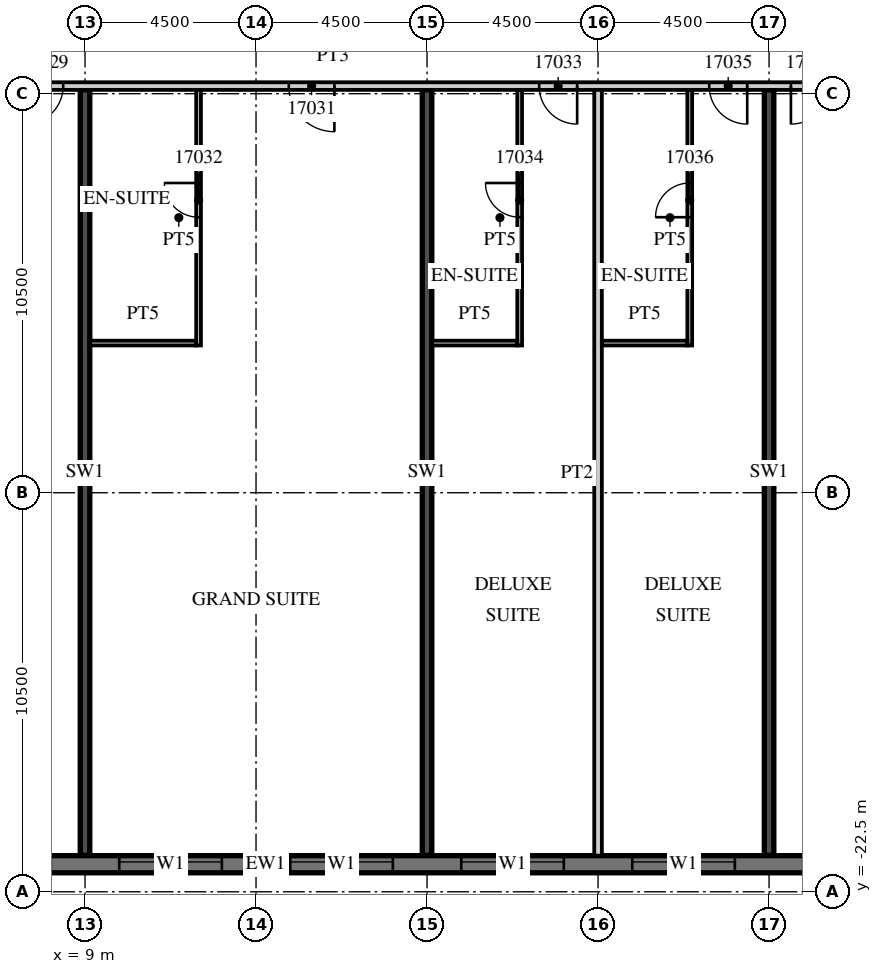
"""IFC4 building model, lengths in metres.
Left out: names, types, materials, properties, quantities, classifications, styles, units other than length and angle.
Written with IfcOpenShell. Run it as: python <this file> out.ifc"""

import sys

from ifc_helpers import new_model, si_unit, direction, frame, frame_2d, origin, place, context, subcontext, project, spatial, rectangle, extrude, element, fill, save


model = new_model("IFC4")
c1 = context("Model", 3, precision=1e-05, world=origin(), true_north=direction((0.0, 1.0)))
c2 = subcontext(c1, "Body", "Model", "MODEL_VIEW")
j1 = project(units=[si_unit("LENGTHUNIT", "METRE"), si_unit("PLANEANGLEUNIT", "RADIAN")], contexts=[c1])
p1 = place(None, origin())
s1 = spatial("IfcSite", under=j1, at=p1, CompositionType="ELEMENT")
p2 = place(p1, origin())
s2 = spatial("IfcBuilding", under=s1, at=p2, CompositionType="ELEMENT")
p3 = place(p2, frame((0.0, 0.0, 86.4)))
s3 = spatial("IfcBuildingStorey", under=s2, at=p3, CompositionType="ELEMENT", Elevation=86.4)
for number, where, z_axis, x_axis in (
    (1, (9.0, -21.54, 0.0), (0.0, 0.0, 1.0), (0.0, 1.0, 0.0)),
    (2, (18.0, -21.54, 0.0), (0.0, 0.0, 1.0), (0.0, 1.0, 0.0)),
    (3, (27.0, -21.54, 0.0), (0.0, 0.0, 1.0), (0.0, 1.0, 0.0)),
):
    element("IfcWall", number, at=place(p3, frame(where, z_axis=z_axis, x_axis=x_axis)), inside=s3, PredefinedType="SHEAR", context=c2, shape_type="SweptSolid", body=[
        extrude(rectangle(XDim=20.14, YDim=0.25, at=frame_2d((10.07, 0.0))), origin(), (0.0, 0.0, 1.0), 3.3),
    ])
p4 = place(p3, frame((-13.5, -21.775, 0.0), z_axis=(0.0, 0.0, 1.0), x_axis=(1.0, 0.0, 0.0)))
e4 = element("IfcWall", 4, at=p4, inside=s3, PredefinedType="SOLIDWALL", context=c2, shape_type="SweptSolid", body=[
    extrude(rectangle(XDim=54.5, YDim=0.45, at=frame_2d((27.25, 0.0))), origin(), (0.0, 0.0, 1.0), 3.02),
])
p5 = place(p4, frame((0.9, 0.0, 0.45)))
e5 = element("IfcOpeningElement", 5, at=p5, cuts=e4, PredefinedType="OPENING", context=c2, shape_type="SweptSolid", body=[
    extrude(rectangle(XDim=2.7, YDim=2.25, at=frame_2d((1.35, 1.125))), frame((0.0, 0.235, 0.0), z_axis=(0.0, -1.0, 0.0), x_axis=(1.0, 0.0, 0.0)), (0.0, 0.0, 1.0), 0.47),
])
p6 = place(p4, frame((5.4, 0.0, 0.45)))
e6 = element("IfcOpeningElement", 6, at=p6, cuts=e4, PredefinedType="OPENING", context=c2, shape_type="SweptSolid", body=[
    extrude(rectangle(XDim=2.7, YDim=2.25, at=frame_2d((1.35, 1.125))), frame((0.0, 0.235, 0.0), z_axis=(0.0, -1.0, 0.0), x_axis=(1.0, 0.0, 0.0)), (0.0, 0.0, 1.0), 0.47),
])
p7 = place(p4, frame((9.9, 0.0, 0.45)))
e7 = element("IfcOpeningElement", 7, at=p7, cuts=e4, PredefinedType="OPENING", context=c2, shape_type="SweptSolid", body=[
    extrude(rectangle(XDim=2.7, YDim=2.25, at=frame_2d((1.35, 1.125))), frame((0.0, 0.235, 0.0), z_axis=(0.0, -1.0, 0.0), x_axis=(1.0, 0.0, 0.0)), (0.0, 0.0, 1.0), 0.47),
])
p8 = place(p4, frame((14.4, 0.0, 0.45)))
e8 = element("IfcOpeningElement", 8, at=p8, cuts=e4, PredefinedType="OPENING", context=c2, shape_type="SweptSolid", body=[
    extrude(rectangle(XDim=2.7, YDim=2.25, at=frame_2d((1.35, 1.125))), frame((0.0, 0.235, 0.0), z_axis=(0.0, -1.0, 0.0), x_axis=(1.0, 0.0, 0.0)), (0.0, 0.0, 1.0), 0.47),
])
p9 = place(p4, frame((18.9, 0.0, 0.45)))
e9 = element("IfcOpeningElement", 9, at=p9, cuts=e4, PredefinedType="OPENING", context=c2, shape_type="SweptSolid", body=[
    extrude(rectangle(XDim=2.7, YDim=2.25, at=frame_2d((1.35, 1.125))), frame((0.0, 0.235, 0.0), z_axis=(0.0, -1.0, 0.0), x_axis=(1.0, 0.0, 0.0)), (0.0, 0.0, 1.0), 0.47),
])
p10 = place(p4, frame((23.4, 0.0, 0.45)))
e10 = element("IfcOpeningElement", 10, at=p10, cuts=e4, PredefinedType="OPENING", context=c2, shape_type="SweptSolid", body=[
    extrude(rectangle(XDim=2.7, YDim=2.25, at=frame_2d((1.35, 1.125))), frame((0.0, 0.235, 0.0), z_axis=(0.0, -1.0, 0.0), x_axis=(1.0, 0.0, 0.0)), (0.0, 0.0, 1.0), 0.47),
])
p11 = place(p4, frame((27.9, 0.0, 0.45)))
e11 = element("IfcOpeningElement", 11, at=p11, cuts=e4, PredefinedType="OPENING", context=c2, shape_type="SweptSolid", body=[
    extrude(rectangle(XDim=2.7, YDim=2.25, at=frame_2d((1.35, 1.125))), frame((0.0, 0.235, 0.0), z_axis=(0.0, -1.0, 0.0), x_axis=(1.0, 0.0, 0.0)), (0.0, 0.0, 1.0), 0.47),
])
p12 = place(p4, frame((32.4, 0.0, 0.45)))
e12 = element("IfcOpeningElement", 12, at=p12, cuts=e4, PredefinedType="OPENING", context=c2, shape_type="SweptSolid", body=[
    extrude(rectangle(XDim=2.7, YDim=2.25, at=frame_2d((1.35, 1.125))), frame((0.0, 0.235, 0.0), z_axis=(0.0, -1.0, 0.0), x_axis=(1.0, 0.0, 0.0)), (0.0, 0.0, 1.0), 0.47),
])
p13 = place(p4, frame((36.9, 0.0, 0.45)))
e13 = element("IfcOpeningElement", 13, at=p13, cuts=e4, PredefinedType="OPENING", context=c2, shape_type="SweptSolid", body=[
    extrude(rectangle(XDim=2.7, YDim=2.25, at=frame_2d((1.35, 1.125))), frame((0.0, 0.235, 0.0), z_axis=(0.0, -1.0, 0.0), x_axis=(1.0, 0.0, 0.0)), (0.0, 0.0, 1.0), 0.47),
])
p14 = place(p4, frame((41.4, 0.0, 0.45)))
e14 = element("IfcOpeningElement", 14, at=p14, cuts=e4, PredefinedType="OPENING", context=c2, shape_type="SweptSolid", body=[
    extrude(rectangle(XDim=2.7, YDim=2.25, at=frame_2d((1.35, 1.125))), frame((0.0, 0.235, 0.0), z_axis=(0.0, -1.0, 0.0), x_axis=(1.0, 0.0, 0.0)), (0.0, 0.0, 1.0), 0.47),
])
p15 = place(p4, frame((45.9, 0.0, 0.45)))
e15 = element("IfcOpeningElement", 15, at=p15, cuts=e4, PredefinedType="OPENING", context=c2, shape_type="SweptSolid", body=[
    extrude(rectangle(XDim=2.7, YDim=2.25, at=frame_2d((1.35, 1.125))), frame((0.0, 0.235, 0.0), z_axis=(0.0, -1.0, 0.0), x_axis=(1.0, 0.0, 0.0)), (0.0, 0.0, 1.0), 0.47),
])
p16 = place(p4, frame((50.4, 0.0, 0.45)))
e16 = element("IfcOpeningElement", 16, at=p16, cuts=e4, PredefinedType="OPENING", context=c2, shape_type="SweptSolid", body=[
    extrude(rectangle(XDim=2.7, YDim=2.25, at=frame_2d((1.35, 1.125))), frame((0.0, 0.235, 0.0), z_axis=(0.0, -1.0, 0.0), x_axis=(1.0, 0.0, 0.0)), (0.0, 0.0, 1.0), 0.47),
])
p17 = place(p3, frame((-13.5, -1.3, 0.0), z_axis=(0.0, 0.0, 1.0), x_axis=(1.0, 0.0, 0.0)))
e17 = element("IfcWall", 17, at=p17, inside=s3, PredefinedType="PARTITIONING", context=c2, shape_type="SweptSolid", body=[
    extrude(rectangle(XDim=58.05, YDim=0.2, at=frame_2d((29.025, 0.0))), origin(), (0.0, 0.0, 1.0), 3.02),
])
p18 = place(p17, frame((2.925, 0.0, 0.0)))
e18 = element("IfcOpeningElement", 18, at=p18, cuts=e17, PredefinedType="OPENING", context=c2, shape_type="SweptSolid", body=[
    extrude(rectangle(XDim=1.0, YDim=2.1, at=frame_2d((0.5, 1.05))), frame((0.0, 0.11, 0.0), z_axis=(0.0, -1.0, 0.0), x_axis=(1.0, 0.0, 0.0)), (0.0, 0.0, 1.0), 0.22),
])
p19 = place(p17, frame((5.075, 0.0, 0.0)))
e19 = element("IfcOpeningElement", 19, at=p19, cuts=e17, PredefinedType="OPENING", context=c2, shape_type="SweptSolid", body=[
    extrude(rectangle(XDim=1.0, YDim=2.1, at=frame_2d((0.5, 1.05))), frame((0.0, 0.11, 0.0), z_axis=(0.0, -1.0, 0.0), x_axis=(1.0, 0.0, 0.0)), (0.0, 0.0, 1.0), 0.22),
])
p20 = place(p17, frame((9.55, 0.0, 0.0)))
e20 = element("IfcOpeningElement", 20, at=p20, cuts=e17, PredefinedType="OPENING", context=c2, shape_type="SweptSolid", body=[
    extrude(rectangle(XDim=1.0, YDim=2.1, at=frame_2d((0.5, 1.05))), frame((0.0, 0.11, 0.0), z_axis=(0.0, -1.0, 0.0), x_axis=(1.0, 0.0, 0.0)), (0.0, 0.0, 1.0), 0.22),
])
p21 = place(p17, frame((14.075, 0.0, 0.0)))
e21 = element("IfcOpeningElement", 21, at=p21, cuts=e17, PredefinedType="OPENING", context=c2, shape_type="SweptSolid", body=[
    extrude(rectangle(XDim=1.0, YDim=2.1, at=frame_2d((0.5, 1.05))), frame((0.0, 0.11, 0.0), z_axis=(0.0, -1.0, 0.0), x_axis=(1.0, 0.0, 0.0)), (0.0, 0.0, 1.0), 0.22),
])
p22 = place(p17, frame((20.925, 0.0, 0.0)))
e22 = element("IfcOpeningElement", 22, at=p22, cuts=e17, PredefinedType="OPENING", context=c2, shape_type="SweptSolid", body=[
    extrude(rectangle(XDim=1.0, YDim=2.1, at=frame_2d((0.5, 1.05))), frame((0.0, 0.11, 0.0), z_axis=(0.0, -1.0, 0.0), x_axis=(1.0, 0.0, 0.0)), (0.0, 0.0, 1.0), 0.22),
])
p23 = place(p17, frame((27.862, 0.0, 0.0)))
e23 = element("IfcOpeningElement", 23, at=p23, cuts=e17, PredefinedType="OPENING", context=c2, shape_type="SweptSolid", body=[
    extrude(rectangle(XDim=1.2, YDim=2.1, at=frame_2d((0.6, 1.05))), frame((0.0, 0.11, 0.0), z_axis=(0.0, -1.0, 0.0), x_axis=(1.0, 0.0, 0.0)), (0.0, 0.0, 1.0), 0.22),
])
p24 = place(p17, frame((34.45, 0.0, 0.0)))
e24 = element("IfcOpeningElement", 24, at=p24, cuts=e17, PredefinedType="OPENING", context=c2, shape_type="SweptSolid", body=[
    extrude(rectangle(XDim=1.0, YDim=2.1, at=frame_2d((0.5, 1.05))), frame((0.0, 0.11, 0.0), z_axis=(0.0, -1.0, 0.0), x_axis=(1.0, 0.0, 0.0)), (0.0, 0.0, 1.0), 0.22),
])
p25 = place(p17, frame((38.925, 0.0, 0.0)))
e25 = element("IfcOpeningElement", 25, at=p25, cuts=e17, PredefinedType="OPENING", context=c2, shape_type="SweptSolid", body=[
    extrude(rectangle(XDim=1.0, YDim=2.1, at=frame_2d((0.5, 1.05))), frame((0.0, 0.11, 0.0), z_axis=(0.0, -1.0, 0.0), x_axis=(1.0, 0.0, 0.0)), (0.0, 0.0, 1.0), 0.22),
])
p26 = place(p17, frame((41.075, 0.0, 0.0)))
e26 = element("IfcOpeningElement", 26, at=p26, cuts=e17, PredefinedType="OPENING", context=c2, shape_type="SweptSolid", body=[
    extrude(rectangle(XDim=1.0, YDim=2.1, at=frame_2d((0.5, 1.05))), frame((0.0, 0.11, 0.0), z_axis=(0.0, -1.0, 0.0), x_axis=(1.0, 0.0, 0.0)), (0.0, 0.0, 1.0), 0.22),
])
p27 = place(p17, frame((45.55, 0.0, 0.0)))
e27 = element("IfcOpeningElement", 27, at=p27, cuts=e17, PredefinedType="OPENING", context=c2, shape_type="SweptSolid", body=[
    extrude(rectangle(XDim=1.0, YDim=2.1, at=frame_2d((0.5, 1.05))), frame((0.0, 0.11, 0.0), z_axis=(0.0, -1.0, 0.0), x_axis=(1.0, 0.0, 0.0)), (0.0, 0.0, 1.0), 0.22),
])
p28 = place(p17, frame((50.075, 0.0, 0.0)))
e28 = element("IfcOpeningElement", 28, at=p28, cuts=e17, PredefinedType="OPENING", context=c2, shape_type="SweptSolid", body=[
    extrude(rectangle(XDim=1.0, YDim=2.1, at=frame_2d((0.5, 1.05))), frame((0.0, 0.11, 0.0), z_axis=(0.0, -1.0, 0.0), x_axis=(1.0, 0.0, 0.0)), (0.0, 0.0, 1.0), 0.22),
])
p29 = place(p17, frame((56.525, 0.0, 0.0)))
e29 = element("IfcOpeningElement", 29, at=p29, cuts=e17, PredefinedType="OPENING", context=c2, shape_type="SweptSolid", body=[
    extrude(rectangle(XDim=1.0, YDim=2.1, at=frame_2d((0.5, 1.05))), frame((0.0, 0.11, 0.0), z_axis=(0.0, -1.0, 0.0), x_axis=(1.0, 0.0, 0.0)), (0.0, 0.0, 1.0), 0.22),
])
p30 = place(p3, frame((11.988, -8.125, 0.0), z_axis=(0.0, 0.0, 1.0), x_axis=(0.0, 1.0, 0.0)))
e30 = element("IfcWall", 30, at=p30, inside=s3, PredefinedType="PARTITIONING", context=c2, shape_type="SweptSolid", body=[
    extrude(rectangle(XDim=6.725, YDim=0.125, at=frame_2d((3.363, 0.0))), origin(), (0.0, 0.0, 1.0), 3.02),
])
p31 = place(p30, frame((3.375, 0.0, 0.0)))
e31 = element("IfcOpeningElement", 31, at=p31, cuts=e30, PredefinedType="OPENING", context=c2, shape_type="SweptSolid", body=[
    extrude(rectangle(XDim=0.9, YDim=2.1, at=frame_2d((0.45, 1.05))), frame((0.0, 0.073, 0.0), z_axis=(0.0, -1.0, 0.0), x_axis=(1.0, 0.0, 0.0)), (0.0, 0.0, 1.0), 0.145),
])
p32 = place(p3, frame((9.125, -8.062, 0.0), z_axis=(0.0, 0.0, 1.0), x_axis=(1.0, 0.0, 0.0)))
e32 = element("IfcWall", 32, at=p32, inside=s3, PredefinedType="PARTITIONING", context=c2, shape_type="SweptSolid", body=[
    extrude(rectangle(XDim=2.8, YDim=0.125, at=frame_2d((1.4, 0.0))), origin(), (0.0, 0.0, 1.0), 3.02),
])
p33 = place(p3, frame((22.5, -21.55, 0.0), z_axis=(0.0, 0.0, 1.0), x_axis=(0.0, 1.0, 0.0)))
e33 = element("IfcWall", 33, at=p33, inside=s3, PredefinedType="PARTITIONING", context=c2, shape_type="SweptSolid", body=[
    extrude(rectangle(XDim=20.15, YDim=0.2, at=frame_2d((10.075, 0.0))), origin(), (0.0, 0.0, 1.0), 3.02),
])
p34 = place(p3, frame((20.438, -8.125, 0.0), z_axis=(0.0, 0.0, 1.0), x_axis=(0.0, 1.0, 0.0)))
e34 = element("IfcWall", 34, at=p34, inside=s3, PredefinedType="PARTITIONING", context=c2, shape_type="SweptSolid", body=[
    extrude(rectangle(XDim=6.725, YDim=0.125, at=frame_2d((3.363, 0.0))), origin(), (0.0, 0.0, 1.0), 3.02),
])
p35 = place(p34, frame((3.375, 0.0, 0.0)))
e35 = element("IfcOpeningElement", 35, at=p35, cuts=e34, PredefinedType="OPENING", context=c2, shape_type="SweptSolid", body=[
    extrude(rectangle(XDim=0.9, YDim=2.1, at=frame_2d((0.45, 1.05))), frame((0.0, 0.073, 0.0), z_axis=(0.0, -1.0, 0.0), x_axis=(1.0, 0.0, 0.0)), (0.0, 0.0, 1.0), 0.145),
])
p36 = place(p3, frame((18.125, -8.062, 0.0), z_axis=(0.0, 0.0, 1.0), x_axis=(1.0, 0.0, 0.0)))
e36 = element("IfcWall", 36, at=p36, inside=s3, PredefinedType="PARTITIONING", context=c2, shape_type="SweptSolid", body=[
    extrude(rectangle(XDim=2.25, YDim=0.125, at=frame_2d((1.125, 0.0))), origin(), (0.0, 0.0, 1.0), 3.02),
])
p37 = place(p3, frame((24.913, -8.125, 0.0), z_axis=(0.0, 0.0, 1.0), x_axis=(0.0, 1.0, 0.0)))
e37 = element("IfcWall", 37, at=p37, inside=s3, PredefinedType="PARTITIONING", context=c2, shape_type="SweptSolid", body=[
    extrude(rectangle(XDim=6.725, YDim=0.125, at=frame_2d((3.363, 0.0))), origin(), (0.0, 0.0, 1.0), 3.02),
])
p38 = place(p37, frame((3.375, 0.0, 0.0)))
e38 = element("IfcOpeningElement", 38, at=p38, cuts=e37, PredefinedType="OPENING", context=c2, shape_type="SweptSolid", body=[
    extrude(rectangle(XDim=0.9, YDim=2.1, at=frame_2d((0.45, 1.05))), frame((0.0, 0.073, 0.0), z_axis=(0.0, -1.0, 0.0), x_axis=(1.0, 0.0, 0.0)), (0.0, 0.0, 1.0), 0.145),
])
p39 = place(p3, frame((22.6, -8.062, 0.0), z_axis=(0.0, 0.0, 1.0), x_axis=(1.0, 0.0, 0.0)))
e39 = element("IfcWall", 39, at=p39, inside=s3, PredefinedType="PARTITIONING", context=c2, shape_type="SweptSolid", body=[
    extrude(rectangle(XDim=2.25, YDim=0.125, at=frame_2d((1.125, 0.0))), origin(), (0.0, 0.0, 1.0), 3.02),
])
p40 = place(p10, origin())
e40 = element("IfcWindow", 40, at=p40, inside=s3, PartitioningType="SINGLE_PANEL", PredefinedType="WINDOW", context=c2, shape_type="SweptSolid", body=[
    extrude(rectangle(XDim=2.7, YDim=2.25, at=frame_2d((1.35, 1.125))), frame((0.0, 0.09, 0.0), z_axis=(0.0, -1.0, 0.0), x_axis=(1.0, 0.0, 0.0)), (0.0, 0.0, 1.0), 0.06),
])
fill(e10, e40)
p41 = place(p11, origin())
e41 = element("IfcWindow", 41, at=p41, inside=s3, PartitioningType="SINGLE_PANEL", PredefinedType="WINDOW", context=c2, shape_type="SweptSolid", body=[
    extrude(rectangle(XDim=2.7, YDim=2.25, at=frame_2d((1.35, 1.125))), frame((0.0, 0.09, 0.0), z_axis=(0.0, -1.0, 0.0), x_axis=(1.0, 0.0, 0.0)), (0.0, 0.0, 1.0), 0.06),
])
fill(e11, e41)
p42 = place(p12, origin())
e42 = element("IfcWindow", 42, at=p42, inside=s3, PartitioningType="SINGLE_PANEL", PredefinedType="WINDOW", context=c2, shape_type="SweptSolid", body=[
    extrude(rectangle(XDim=2.7, YDim=2.25, at=frame_2d((1.35, 1.125))), frame((0.0, 0.09, 0.0), z_axis=(0.0, -1.0, 0.0), x_axis=(1.0, 0.0, 0.0)), (0.0, 0.0, 1.0), 0.06),
])
fill(e12, e42)
p43 = place(p13, origin())
e43 = element("IfcWindow", 43, at=p43, inside=s3, PartitioningType="SINGLE_PANEL", PredefinedType="WINDOW", context=c2, shape_type="SweptSolid", body=[
    extrude(rectangle(XDim=2.7, YDim=2.25, at=frame_2d((1.35, 1.125))), frame((0.0, 0.09, 0.0), z_axis=(0.0, -1.0, 0.0), x_axis=(1.0, 0.0, 0.0)), (0.0, 0.0, 1.0), 0.06),
])
fill(e13, e43)
p44 = place(p22, origin())
e44 = element("IfcDoor", 44, at=p44, inside=s3, OperationType="SINGLE_SWING_LEFT", PredefinedType="DOOR", context=c2, shape_type="SweptSolid", body=[
    extrude(rectangle(XDim=1.0, YDim=2.1, at=frame_2d((0.5, 1.05))), frame((0.0, 0.025, 0.0), z_axis=(0.0, -1.0, 0.0), x_axis=(1.0, 0.0, 0.0)), (0.0, 0.0, 1.0), 0.05),
])
fill(e22, e44)
p45 = place(p23, origin())
e45 = element("IfcDoor", 45, at=p45, inside=s3, OperationType="SINGLE_SWING_RIGHT", PredefinedType="DOOR", context=c2, shape_type="SweptSolid", body=[
    extrude(rectangle(XDim=1.2, YDim=2.1, at=frame_2d((0.6, 1.05))), frame((0.0, 0.025, 0.0), z_axis=(0.0, -1.0, 0.0), x_axis=(1.0, 0.0, 0.0)), (0.0, 0.0, 1.0), 0.05),
])
fill(e23, e45)
p46 = place(p31, origin())
e46 = element("IfcDoor", 46, at=p46, inside=s3, OperationType="SINGLE_SWING_RIGHT", PredefinedType="DOOR", context=c2, shape_type="SweptSolid", body=[
    extrude(rectangle(XDim=0.9, YDim=2.1, at=frame_2d((0.45, 1.05))), frame((0.0, 0.025, 0.0), z_axis=(0.0, -1.0, 0.0), x_axis=(1.0, 0.0, 0.0)), (0.0, 0.0, 1.0), 0.05),
])
fill(e31, e46)
p47 = place(p24, origin())
e47 = element("IfcDoor", 47, at=p47, inside=s3, OperationType="SINGLE_SWING_RIGHT", PredefinedType="DOOR", context=c2, shape_type="SweptSolid", body=[
    extrude(rectangle(XDim=1.0, YDim=2.1, at=frame_2d((0.5, 1.05))), frame((0.0, 0.025, 0.0), z_axis=(0.0, -1.0, 0.0), x_axis=(1.0, 0.0, 0.0)), (0.0, 0.0, 1.0), 0.05),
])
fill(e24, e47)
p48 = place(p35, origin())
e48 = element("IfcDoor", 48, at=p48, inside=s3, OperationType="SINGLE_SWING_RIGHT", PredefinedType="DOOR", context=c2, shape_type="SweptSolid", body=[
    extrude(rectangle(XDim=0.9, YDim=2.1, at=frame_2d((0.45, 1.05))), frame((0.0, 0.025, 0.0), z_axis=(0.0, -1.0, 0.0), x_axis=(1.0, 0.0, 0.0)), (0.0, 0.0, 1.0), 0.05),
])
fill(e35, e48)
p49 = place(p25, origin())
e49 = element("IfcDoor", 49, at=p49, inside=s3, OperationType="SINGLE_SWING_RIGHT", PredefinedType="DOOR", context=c2, shape_type="SweptSolid", body=[
    extrude(rectangle(XDim=1.0, YDim=2.1, at=frame_2d((0.5, 1.05))), frame((0.0, 0.025, 0.0), z_axis=(0.0, -1.0, 0.0), x_axis=(1.0, 0.0, 0.0)), (0.0, 0.0, 1.0), 0.05),
])
fill(e25, e49)
p50 = place(p38, origin())
e50 = element("IfcDoor", 50, at=p50, inside=s3, OperationType="SINGLE_SWING_LEFT", PredefinedType="DOOR", context=c2, shape_type="SweptSolid", body=[
    extrude(rectangle(XDim=0.9, YDim=2.1, at=frame_2d((0.45, 1.05))), frame((0.0, 0.025, 0.0), z_axis=(0.0, -1.0, 0.0), x_axis=(1.0, 0.0, 0.0)), (0.0, 0.0, 1.0), 0.05),
])
fill(e38, e50)
p51 = place(p26, origin())
e51 = element("IfcDoor", 51, at=p51, inside=s3, OperationType="SINGLE_SWING_LEFT", PredefinedType="DOOR", context=c2, shape_type="SweptSolid", body=[
    extrude(rectangle(XDim=1.0, YDim=2.1, at=frame_2d((0.5, 1.05))), frame((0.0, 0.025, 0.0), z_axis=(0.0, -1.0, 0.0), x_axis=(1.0, 0.0, 0.0)), (0.0, 0.0, 1.0), 0.05),
])
fill(e26, e51)
save(model, sys.argv[1])
